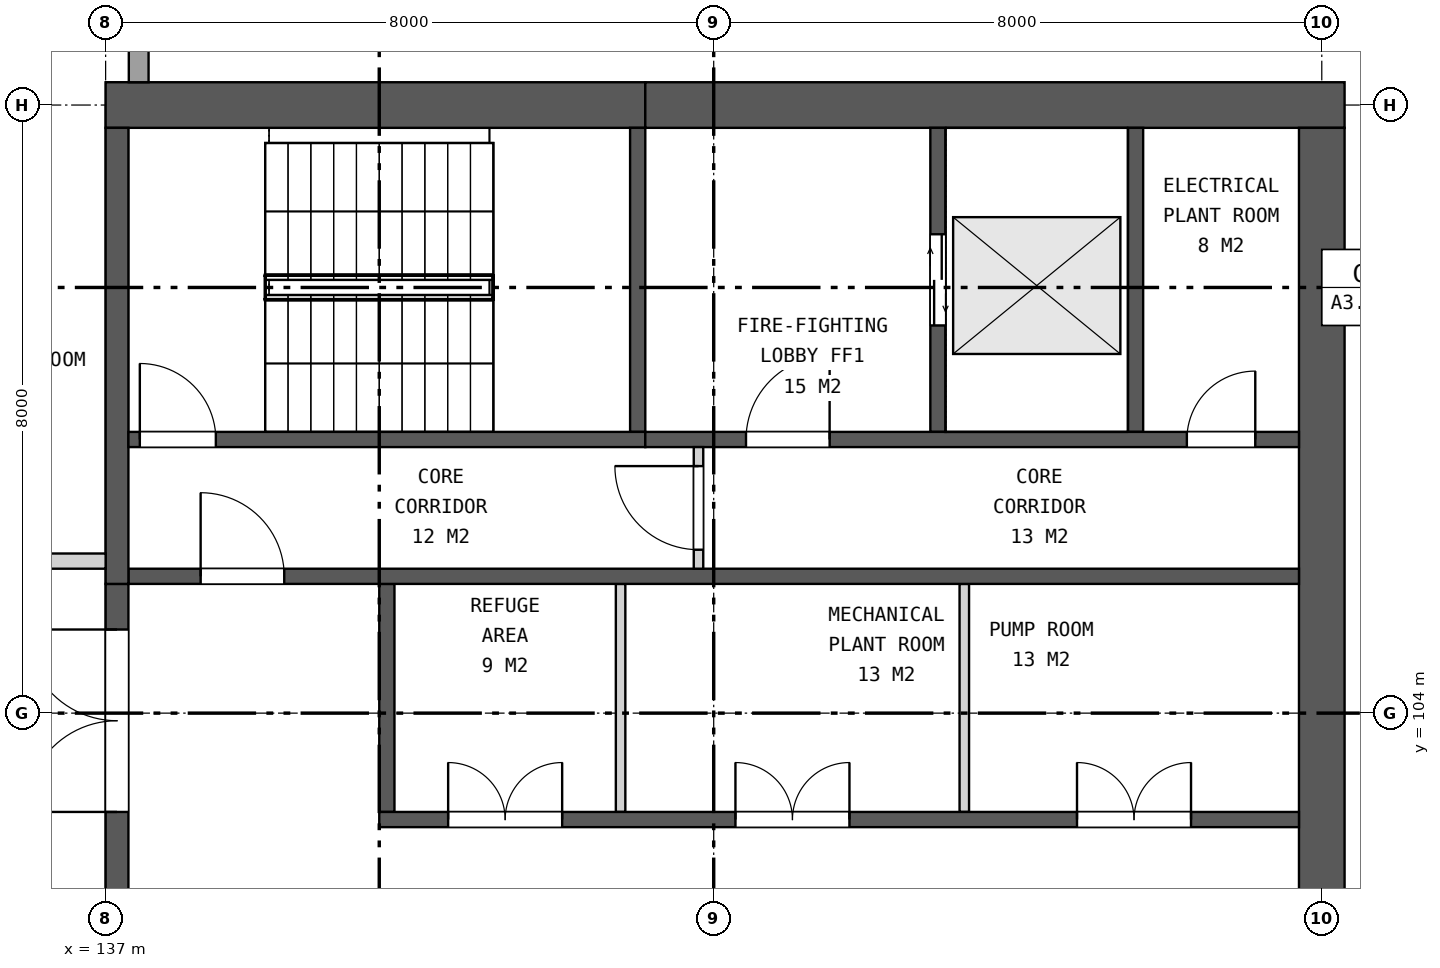
"""IFC4 building model, lengths in metres.
Left out: names, types, materials, properties, quantities, classifications, styles, units other than length and angle.
Written with IfcOpenShell. Run it as: python <this file> out.ifc"""

import sys

from ifc_helpers import new_model, si_unit, direction, frame, frame_2d, origin, place, context, subcontext, project, spatial, rectangle, extrude, element, fill, save


model = new_model("IFC4")
c1 = context("Model", 3, precision=1e-05, world=origin(), true_north=direction((0.0, 1.0)))
c2 = subcontext(c1, "Body", "Model", "MODEL_VIEW")
j1 = project(units=[si_unit("LENGTHUNIT", "METRE"), si_unit("PLANEANGLEUNIT", "RADIAN")], contexts=[c1])
p1 = place(None, origin())
s1 = spatial("IfcSite", under=j1, at=p1, CompositionType="ELEMENT")
p2 = place(p1, origin())
s2 = spatial("IfcBuilding", under=s1, at=p2, CompositionType="ELEMENT")
p3 = place(p2, frame((0.0, 0.0, 237.7)))
s3 = spatial("IfcBuildingStorey", under=s2, at=p3, CompositionType="ELEMENT", Elevation=237.7)
p4 = place(p3, frame((137.0, 112.0, 0.0), z_axis=(0.0, 0.0, 1.0), x_axis=(1.0, 0.0, 0.0)))
e1 = element("IfcWall", 1, at=p4, inside=s3, PredefinedType="SHEAR", context=c2, shape_type="SweptSolid", body=[
    extrude(rectangle(XDim=7.1, YDim=0.6, at=frame_2d((3.55, 0.0))), origin(), (0.0, 0.0, 1.0), 7.4),
])
p5 = place(p3, frame((144.1, 112.0, 0.0), z_axis=(0.0, 0.0, 1.0), x_axis=(1.0, 0.0, 0.0)))
e2 = element("IfcWall", 2, at=p5, inside=s3, PredefinedType="SHEAR", context=c2, shape_type="SweptSolid", body=[
    extrude(rectangle(XDim=9.2, YDim=0.6, at=frame_2d((4.6, 0.0))), origin(), (0.0, 0.0, 1.0), 7.4),
])
p6 = place(p3, frame((153.0, 88.3, 0.0), z_axis=(0.0, 0.0, 1.0), x_axis=(0.0, 1.0, 0.0)))
e3 = element("IfcWall", 3, at=p6, inside=s3, PredefinedType="SHEAR", context=c2, shape_type="SweptSolid", body=[
    extrude(rectangle(XDim=23.4, YDim=0.6, at=frame_2d((11.7, 0.0))), origin(), (0.0, 0.0, 1.0), 7.4),
])
p7 = place(p3, frame((137.15, 94.3, 0.0), z_axis=(0.0, 0.0, 1.0), x_axis=(0.0, 1.0, 0.0)))
e4 = element("IfcWall", 4, at=p7, inside=s3, PredefinedType="SHEAR", context=c2, shape_type="SweptSolid", body=[
    extrude(rectangle(XDim=11.4, YDim=0.3, at=frame_2d((5.7, 0.0))), origin(), (0.0, 0.0, 1.0), 7.4),
])
p8 = place(p7, frame((0.6, 0.0, 0.0)))
e5 = element("IfcOpeningElement", 5, at=p8, cuts=e4, PredefinedType="OPENING", context=c2, shape_type="SweptSolid", body=[
    extrude(rectangle(XDim=2.4, YDim=2.4, at=frame_2d((1.2, 1.2))), frame((0.0, 0.16, 0.0), z_axis=(0.0, -1.0, 0.0), x_axis=(1.0, 0.0, 0.0)), (0.0, 0.0, 1.0), 0.32),
])
p9 = place(p7, frame((4.5, 0.0, 0.0)))
e6 = element("IfcOpeningElement", 6, at=p9, cuts=e4, PredefinedType="OPENING", context=c2, shape_type="SweptSolid", body=[
    extrude(rectangle(XDim=2.4, YDim=2.4, at=frame_2d((1.2, 1.2))), frame((0.0, 0.16, 0.0), z_axis=(0.0, -1.0, 0.0), x_axis=(1.0, 0.0, 0.0)), (0.0, 0.0, 1.0), 0.32),
])
p10 = place(p7, frame((8.4, 0.0, 0.0)))
e7 = element("IfcOpeningElement", 7, at=p10, cuts=e4, PredefinedType="OPENING", context=c2, shape_type="SweptSolid", body=[
    extrude(rectangle(XDim=2.4, YDim=2.4, at=frame_2d((1.2, 1.2))), frame((0.0, 0.16, 0.0), z_axis=(0.0, -1.0, 0.0), x_axis=(1.0, 0.0, 0.0)), (0.0, 0.0, 1.0), 0.32),
])
p11 = place(p3, frame((140.7, 102.7, 0.0), z_axis=(0.0, 0.0, 1.0), x_axis=(0.0, 1.0, 0.0)))
e8 = element("IfcWall", 8, at=p11, inside=s3, PredefinedType="SHEAR", context=c2, shape_type="SweptSolid", body=[
    extrude(rectangle(XDim=3.0, YDim=0.2, at=frame_2d((1.5, 0.0))), origin(), (0.0, 0.0, 1.0), 7.4),
])
for number, where, z_axis, x_axis in (
    (9, (143.775, 102.7, 0.0), (0.0, 0.0, 1.0), (0.0, 1.0, 0.0)),
    (10, (148.297, 102.7, 0.0), (0.0, 0.0, 1.0), (0.0, 1.0, 0.0)),
):
    element("IfcWall", number, at=place(p3, frame(where, z_axis=z_axis, x_axis=x_axis)), inside=s3, PredefinedType="PARTITIONING", context=c2, shape_type="SweptSolid", body=[
        extrude(rectangle(XDim=3.0, YDim=0.125, at=frame_2d((1.5, 0.0))), origin(), (0.0, 0.0, 1.0), 7.4),
    ])
p12 = place(p3, frame((140.6, 102.6, 0.0), z_axis=(0.0, 0.0, 1.0), x_axis=(1.0, 0.0, 0.0)))
e11 = element("IfcWall", 11, at=p12, inside=s3, PredefinedType="SHEAR", context=c2, shape_type="SweptSolid", body=[
    extrude(rectangle(XDim=12.1, YDim=0.2, at=frame_2d((6.05, 0.0))), origin(), (0.0, 0.0, 1.0), 7.4),
])
p13 = place(p12, frame((0.906, 0.0, 0.0)))
e12 = element("IfcOpeningElement", 12, at=p13, cuts=e11, PredefinedType="OPENING", context=c2, shape_type="SweptSolid", body=[
    extrude(rectangle(XDim=1.5, YDim=2.1, at=frame_2d((0.75, 1.05))), frame((0.0, 0.11, 0.0), z_axis=(0.0, -1.0, 0.0), x_axis=(1.0, 0.0, 0.0)), (0.0, 0.0, 1.0), 0.22),
])
p14 = place(p12, frame((4.686, 0.0, 0.0)))
e13 = element("IfcOpeningElement", 13, at=p14, cuts=e11, PredefinedType="OPENING", context=c2, shape_type="SweptSolid", body=[
    extrude(rectangle(XDim=1.5, YDim=2.1, at=frame_2d((0.75, 1.05))), frame((0.0, 0.11, 0.0), z_axis=(0.0, -1.0, 0.0), x_axis=(1.0, 0.0, 0.0)), (0.0, 0.0, 1.0), 0.22),
])
p15 = place(p12, frame((9.18, 0.0, 0.0)))
e14 = element("IfcOpeningElement", 14, at=p15, cuts=e11, PredefinedType="OPENING", context=c2, shape_type="SweptSolid", body=[
    extrude(rectangle(XDim=1.5, YDim=2.1, at=frame_2d((0.75, 1.05))), frame((0.0, 0.11, 0.0), z_axis=(0.0, -1.0, 0.0), x_axis=(1.0, 0.0, 0.0)), (0.0, 0.0, 1.0), 0.22),
])
p16 = place(p3, frame((137.3, 105.8, 0.0), z_axis=(0.0, 0.0, 1.0), x_axis=(1.0, 0.0, 0.0)))
e15 = element("IfcWall", 15, at=p16, inside=s3, PredefinedType="SHEAR", context=c2, shape_type="SweptSolid", body=[
    extrude(rectangle(XDim=15.4, YDim=0.2, at=frame_2d((7.7, 0.0))), origin(), (0.0, 0.0, 1.0), 7.4),
])
p17 = place(p16, frame((0.95, 0.0, 0.0)))
e16 = element("IfcOpeningElement", 16, at=p17, cuts=e15, PredefinedType="OPENING", context=c2, shape_type="SweptSolid", body=[
    extrude(rectangle(XDim=1.1, YDim=2.1, at=frame_2d((0.55, 1.05))), frame((0.0, 0.11, 0.0), z_axis=(0.0, -1.0, 0.0), x_axis=(1.0, 0.0, 0.0)), (0.0, 0.0, 1.0), 0.22),
])
p18 = place(p3, frame((137.15, 105.7, 0.0), z_axis=(0.0, 0.0, 1.0), x_axis=(0.0, 1.0, 0.0)))
e17 = element("IfcWall", 17, at=p18, inside=s3, PredefinedType="SHEAR", context=c2, shape_type="SweptSolid", body=[
    extrude(rectangle(XDim=6.0, YDim=0.3, at=frame_2d((3.0, 0.0))), origin(), (0.0, 0.0, 1.0), 7.4),
])
p19 = place(p3, frame((144.0, 107.7, 0.0), z_axis=(0.0, 0.0, 1.0), x_axis=(0.0, 1.0, 0.0)))
e18 = element("IfcWall", 18, at=p19, inside=s3, PredefinedType="SHEAR", context=c2, shape_type="SweptSolid", body=[
    extrude(rectangle(XDim=4.0, YDim=0.2, at=frame_2d((2.0, 0.0))), origin(), (0.0, 0.0, 1.0), 7.4),
])
p20 = place(p3, frame((147.95, 107.7, 0.0), z_axis=(0.0, 0.0, 1.0), x_axis=(0.0, 1.0, 0.0)))
e19 = element("IfcWall", 19, at=p20, inside=s3, PredefinedType="SHEAR", context=c2, shape_type="SweptSolid", body=[
    extrude(rectangle(XDim=4.0, YDim=0.2, at=frame_2d((2.0, 0.0))), origin(), (0.0, 0.0, 1.0), 7.4),
])
p21 = place(p20, frame((1.4, 0.0, 0.0)))
e20 = element("IfcOpeningElement", 20, at=p21, cuts=e19, PredefinedType="OPENING", context=c2, shape_type="SweptSolid", body=[
    extrude(rectangle(XDim=1.2, YDim=2.1, at=frame_2d((0.6, 1.05))), frame((0.0, 0.11, 0.0), z_axis=(0.0, -1.0, 0.0), x_axis=(1.0, 0.0, 0.0)), (0.0, 0.0, 1.0), 0.22),
])
p22 = place(p3, frame((150.55, 107.7, 0.0), z_axis=(0.0, 0.0, 1.0), x_axis=(0.0, 1.0, 0.0)))
e21 = element("IfcWall", 21, at=p22, inside=s3, PredefinedType="SHEAR", context=c2, shape_type="SweptSolid", body=[
    extrude(rectangle(XDim=4.0, YDim=0.2, at=frame_2d((2.0, 0.0))), origin(), (0.0, 0.0, 1.0), 7.4),
])
p23 = place(p3, frame((137.3, 107.6, 0.0), z_axis=(0.0, 0.0, 1.0), x_axis=(1.0, 0.0, 0.0)))
e22 = element("IfcWall", 22, at=p23, inside=s3, PredefinedType="SHEAR", context=c2, shape_type="SweptSolid", body=[
    extrude(rectangle(XDim=6.8, YDim=0.2, at=frame_2d((3.4, 0.0))), origin(), (0.0, 0.0, 1.0), 7.4),
])
p24 = place(p23, frame((0.15, 0.0, 0.0)))
e23 = element("IfcOpeningElement", 23, at=p24, cuts=e22, PredefinedType="OPENING", context=c2, shape_type="SweptSolid", body=[
    extrude(rectangle(XDim=1.0, YDim=2.1, at=frame_2d((0.5, 1.05))), frame((0.0, 0.11, 0.0), z_axis=(0.0, -1.0, 0.0), x_axis=(1.0, 0.0, 0.0)), (0.0, 0.0, 1.0), 0.22),
])
p25 = place(p3, frame((144.1, 107.6, 0.0), z_axis=(0.0, 0.0, 1.0), x_axis=(1.0, 0.0, 0.0)))
e24 = element("IfcWall", 24, at=p25, inside=s3, PredefinedType="SHEAR", context=c2, shape_type="SweptSolid", body=[
    extrude(rectangle(XDim=8.6, YDim=0.2, at=frame_2d((4.3, 0.0))), origin(), (0.0, 0.0, 1.0), 7.4),
])
p26 = place(p25, frame((1.325, 0.0, 0.0)))
e25 = element("IfcOpeningElement", 25, at=p26, cuts=e24, PredefinedType="OPENING", context=c2, shape_type="SweptSolid", body=[
    extrude(rectangle(XDim=1.1, YDim=2.1, at=frame_2d((0.55, 1.05))), frame((0.0, 0.11, 0.0), z_axis=(0.0, -1.0, 0.0), x_axis=(1.0, 0.0, 0.0)), (0.0, 0.0, 1.0), 0.22),
])
p27 = place(p25, frame((7.125, 0.0, 0.0)))
e26 = element("IfcOpeningElement", 26, at=p27, cuts=e24, PredefinedType="OPENING", context=c2, shape_type="SweptSolid", body=[
    extrude(rectangle(XDim=0.9, YDim=2.1, at=frame_2d((0.45, 1.05))), frame((0.0, 0.11, 0.0), z_axis=(0.0, -1.0, 0.0), x_axis=(1.0, 0.0, 0.0)), (0.0, 0.0, 1.0), 0.22),
])
p28 = place(p3, frame((144.8, 105.9, 0.0), z_axis=(0.0, 0.0, 1.0), x_axis=(0.0, 1.0, 0.0)))
e27 = element("IfcWall", 27, at=p28, inside=s3, PredefinedType="PARTITIONING", context=c2, shape_type="SweptSolid", body=[
    extrude(rectangle(XDim=1.6, YDim=0.125, at=frame_2d((0.8, 0.0))), origin(), (0.0, 0.0, 1.0), 7.4),
])
p29 = place(p28, frame((0.25, 0.0, 0.0)))
e28 = element("IfcOpeningElement", 28, at=p29, cuts=e27, PredefinedType="OPENING", context=c2, shape_type="SweptSolid", body=[
    extrude(rectangle(XDim=1.1, YDim=2.1, at=frame_2d((0.55, 1.05))), frame((0.0, 0.073, 0.0), z_axis=(0.0, -1.0, 0.0), x_axis=(1.0, 0.0, 0.0)), (0.0, 0.0, 1.0), 0.145),
])
p30 = place(p3, frame((137.435, 112.3, 0.0), z_axis=(0.0, 0.0, 1.0), x_axis=(0.0, 1.0, 0.0)))
e29 = element("IfcWall", 29, at=p30, inside=s3, PredefinedType="SOLIDWALL", context=c2, shape_type="SweptSolid", body=[
    extrude(rectangle(XDim=7.7, YDim=0.26, at=frame_2d((3.85, 0.0))), origin(), (0.0, 0.0, 1.0), 7.1),
])
p31 = place(p30, frame((0.5, 0.0, 2.2)))
e30 = element("IfcOpeningElement", 30, at=p31, cuts=e29, PredefinedType="OPENING", context=c2, shape_type="SweptSolid", body=[
    extrude(rectangle(XDim=2.0, YDim=3.0, at=frame_2d((1.0, 1.5))), frame((0.0, 0.14, 0.0), z_axis=(0.0, -1.0, 0.0), x_axis=(1.0, 0.0, 0.0)), (0.0, 0.0, 1.0), 0.28),
])
p32 = place(p30, frame((4.9, 0.0, 1.2)))
e31 = element("IfcOpeningElement", 31, at=p32, cuts=e29, PredefinedType="OPENING", context=c2, shape_type="SweptSolid", body=[
    extrude(rectangle(XDim=2.0, YDim=3.0, at=frame_2d((1.0, 1.5))), frame((0.0, 0.14, 0.0), z_axis=(0.0, -1.0, 0.0), x_axis=(1.0, 0.0, 0.0)), (0.0, 0.0, 1.0), 0.28),
])
p33 = place(p3, frame((131.5, 106.0, 0.0), z_axis=(0.0, 0.0, 1.0), x_axis=(1.0, 0.0, 0.0)))
e32 = element("IfcWall", 32, at=p33, inside=s3, PredefinedType="SOLIDWALL", context=c2, shape_type="SweptSolid", body=[
    extrude(rectangle(XDim=5.5, YDim=0.2, at=frame_2d((2.75, 0.0))), origin(), (0.0, 0.0, 1.0), 6.643),
])
p34 = place(p33, frame((2.25, 0.0, 0.0)))
e33 = element("IfcOpeningElement", 33, at=p34, cuts=e32, PredefinedType="OPENING", context=c2, shape_type="SweptSolid", body=[
    extrude(rectangle(XDim=1.0, YDim=2.1, at=frame_2d((0.5, 1.05))), frame((0.0, 0.11, 0.0), z_axis=(0.0, -1.0, 0.0), x_axis=(1.0, 0.0, 0.0)), (0.0, 0.0, 1.0), 0.22),
])
p35 = place(p10, origin())
e34 = element("IfcDoor", 34, at=p35, inside=s3, OperationType="DOUBLE_DOOR_SINGLE_SWING", PredefinedType="DOOR", context=c2, shape_type="SweptSolid", body=[
    extrude(rectangle(XDim=2.4, YDim=2.4, at=frame_2d((1.2, 1.2))), frame((0.0, 0.025, 0.0), z_axis=(0.0, -1.0, 0.0), x_axis=(1.0, 0.0, 0.0)), (0.0, 0.0, 1.0), 0.05),
])
fill(e7, e34)
p36 = place(p13, origin())
e35 = element("IfcDoor", 35, at=p36, inside=s3, OperationType="DOUBLE_DOOR_SINGLE_SWING", PredefinedType="DOOR", context=c2, shape_type="SweptSolid", body=[
    extrude(rectangle(XDim=1.5, YDim=2.1, at=frame_2d((0.75, 1.05))), frame((0.0, 0.025, 0.0), z_axis=(0.0, -1.0, 0.0), x_axis=(1.0, 0.0, 0.0)), (0.0, 0.0, 1.0), 0.05),
])
fill(e12, e35)
p37 = place(p14, origin())
e36 = element("IfcDoor", 36, at=p37, inside=s3, OperationType="DOUBLE_DOOR_SINGLE_SWING", PredefinedType="DOOR", context=c2, shape_type="SweptSolid", body=[
    extrude(rectangle(XDim=1.5, YDim=2.1, at=frame_2d((0.75, 1.05))), frame((0.0, 0.025, 0.0), z_axis=(0.0, -1.0, 0.0), x_axis=(1.0, 0.0, 0.0)), (0.0, 0.0, 1.0), 0.05),
])
fill(e13, e36)
p38 = place(p15, origin())
e37 = element("IfcDoor", 37, at=p38, inside=s3, OperationType="DOUBLE_DOOR_SINGLE_SWING", PredefinedType="DOOR", context=c2, shape_type="SweptSolid", body=[
    extrude(rectangle(XDim=1.5, YDim=2.1, at=frame_2d((0.75, 1.05))), frame((0.0, 0.025, 0.0), z_axis=(0.0, -1.0, 0.0), x_axis=(1.0, 0.0, 0.0)), (0.0, 0.0, 1.0), 0.05),
])
fill(e14, e37)
p39 = place(p17, origin())
e38 = element("IfcDoor", 38, at=p39, inside=s3, OperationType="SINGLE_SWING_LEFT", PredefinedType="DOOR", context=c2, shape_type="SweptSolid", body=[
    extrude(rectangle(XDim=1.1, YDim=2.1, at=frame_2d((0.55, 1.05))), frame((0.0, 0.025, 0.0), z_axis=(0.0, -1.0, 0.0), x_axis=(1.0, 0.0, 0.0)), (0.0, 0.0, 1.0), 0.05),
])
fill(e16, e38)
p40 = place(p21, origin())
e39 = element("IfcDoor", 39, at=p40, inside=s3, OperationType="DOUBLE_DOOR_SLIDING", PredefinedType="DOOR", context=c2, shape_type="SweptSolid", body=[
    extrude(rectangle(XDim=1.2, YDim=2.1, at=frame_2d((0.6, 1.05))), frame((0.0, 0.025, 0.0), z_axis=(0.0, -1.0, 0.0), x_axis=(1.0, 0.0, 0.0)), (0.0, 0.0, 1.0), 0.05),
])
fill(e20, e39)
p41 = place(p24, origin())
e40 = element("IfcDoor", 40, at=p41, inside=s3, OperationType="SINGLE_SWING_LEFT", PredefinedType="DOOR", context=c2, shape_type="SweptSolid", body=[
    extrude(rectangle(XDim=1.0, YDim=2.1, at=frame_2d((0.5, 1.05))), frame((0.0, 0.025, 0.0), z_axis=(0.0, -1.0, 0.0), x_axis=(1.0, 0.0, 0.0)), (0.0, 0.0, 1.0), 0.05),
])
fill(e23, e40)
p42 = place(p26, origin())
e41 = element("IfcDoor", 41, at=p42, inside=s3, OperationType="SINGLE_SWING_RIGHT", PredefinedType="DOOR", context=c2, shape_type="SweptSolid", body=[
    extrude(rectangle(XDim=1.1, YDim=2.1, at=frame_2d((0.55, 1.05))), frame((0.0, 0.025, 0.0), z_axis=(0.0, -1.0, 0.0), x_axis=(1.0, 0.0, 0.0)), (0.0, 0.0, 1.0), 0.05),
])
fill(e25, e41)
p43 = place(p27, origin())
e42 = element("IfcDoor", 42, at=p43, inside=s3, OperationType="SINGLE_SWING_RIGHT", PredefinedType="DOOR", context=c2, shape_type="SweptSolid", body=[
    extrude(rectangle(XDim=0.9, YDim=2.1, at=frame_2d((0.45, 1.05))), frame((0.0, 0.025, 0.0), z_axis=(0.0, -1.0, 0.0), x_axis=(1.0, 0.0, 0.0)), (0.0, 0.0, 1.0), 0.05),
])
fill(e26, e42)
p44 = place(p29, origin())
e43 = element("IfcDoor", 43, at=p44, inside=s3, OperationType="SINGLE_SWING_RIGHT", PredefinedType="DOOR", context=c2, shape_type="SweptSolid", body=[
    extrude(rectangle(XDim=1.1, YDim=2.1, at=frame_2d((0.55, 1.05))), frame((0.0, 0.025, 0.0), z_axis=(0.0, -1.0, 0.0), x_axis=(1.0, 0.0, 0.0)), (0.0, 0.0, 1.0), 0.05),
])
fill(e28, e43)
save(model, sys.argv[1])
